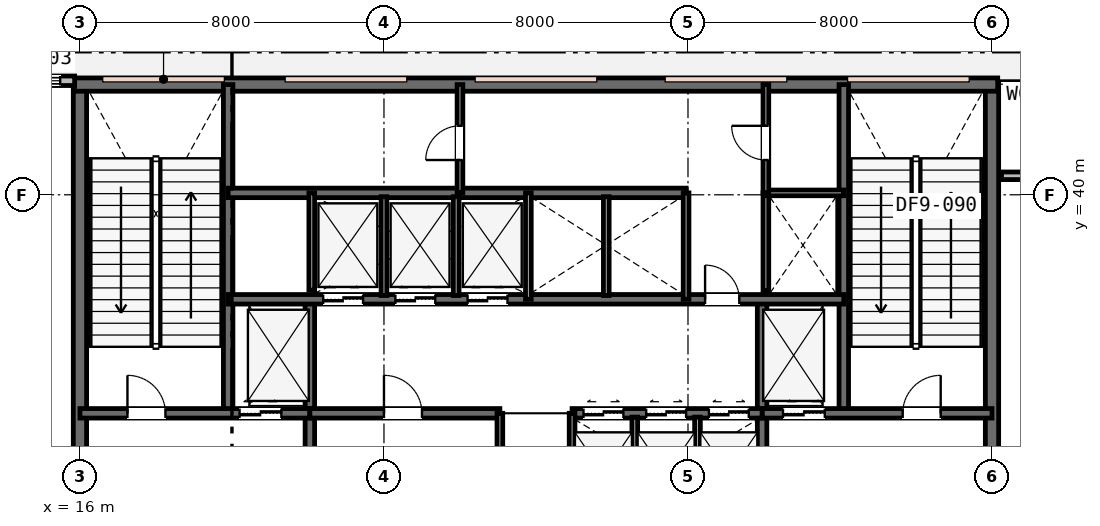
"""IFC4 building model, lengths in metres.
Left out: names, types, materials, properties, quantities, classifications, styles, units other than length and angle.
Written with IfcOpenShell. Run it as: python <this file> out.ifc"""

import sys

from ifc_helpers import new_model, si_unit, direction, frame, frame_2d, origin, place, context, subcontext, project, spatial, rectangle, extrude, element, fill, save


model = new_model("IFC4")
c1 = context("Model", 3, precision=1e-05, world=origin(), true_north=direction((0.0, 1.0)))
c2 = subcontext(c1, "Body", "Model", "MODEL_VIEW")
j1 = project(units=[si_unit("LENGTHUNIT", "METRE"), si_unit("PLANEANGLEUNIT", "RADIAN")], contexts=[c1])
p1 = place(None, origin())
s1 = spatial("IfcSite", under=j1, at=p1, CompositionType="ELEMENT")
p2 = place(p1, origin())
s2 = spatial("IfcBuilding", under=s1, at=p2, CompositionType="ELEMENT")
p3 = place(p2, frame((0.0, 0.0, 148.8)))
s3 = spatial("IfcBuildingStorey", under=s2, at=p3, CompositionType="ELEMENT", Elevation=148.8)
for number, where, z_axis, x_axis in (
    (1, (16.0, 30.65, 0.0), (0.0, 0.0, 1.0), (0.0, 1.0, 0.0)),
    (2, (40.0, 30.65, 0.0), (0.0, 0.0, 1.0), (0.0, 1.0, 0.0)),
):
    element("IfcWall", number, at=place(p3, frame(where, z_axis=z_axis, x_axis=x_axis)), inside=s3, PredefinedType="SHEAR", context=c2, shape_type="SweptSolid", body=[
        extrude(rectangle(XDim=12.3, YDim=0.35, at=frame_2d((6.15, 0.0))), origin(), (0.0, 0.0, 1.0), 5.4),
    ])
p4 = place(p3, frame((15.85, 42.9, 0.0), z_axis=(0.0, 0.0, 1.0), x_axis=(1.0, 0.0, 0.0)))
e3 = element("IfcWall", 3, at=p4, inside=s3, PredefinedType="SHEAR", context=c2, shape_type="SweptSolid", body=[
    extrude(rectangle(XDim=24.3, YDim=0.35, at=frame_2d((12.15, 0.0))), origin(), (0.0, 0.0, 1.0), 5.4),
])
for number, where, z_axis, x_axis in (
    (4, (19.9, 34.25, 0.0), (0.0, 0.0, 1.0), (0.0, 1.0, 0.0)),
    (5, (36.1, 34.25, 0.0), (0.0, 0.0, 1.0), (0.0, 1.0, 0.0)),
):
    element("IfcWall", number, at=place(p3, frame(where, z_axis=z_axis, x_axis=x_axis)), inside=s3, PredefinedType="SHEAR", context=c2, shape_type="SweptSolid", body=[
        extrude(rectangle(XDim=8.65, YDim=0.25, at=frame_2d((4.325, 0.0))), origin(), (0.0, 0.0, 1.0), 5.4),
    ])
for number, where, z_axis, x_axis in (
    (6, (22.05, 30.8, 0.0), (0.0, 0.0, 1.0), (0.0, 1.0, 0.0)),
    (7, (33.95, 30.8, 0.0), (0.0, 0.0, 1.0), (0.0, 1.0, 0.0)),
):
    element("IfcWall", number, at=place(p3, frame(where, z_axis=z_axis, x_axis=x_axis)), inside=s3, PredefinedType="SHEAR", context=c2, shape_type="SweptSolid", body=[
        extrude(rectangle(XDim=6.45, YDim=0.25, at=frame_2d((3.225, 0.0))), origin(), (0.0, 0.0, 1.0), 5.4),
    ])
p5 = place(p3, frame((16.0, 34.25, 0.0), z_axis=(0.0, 0.0, 1.0), x_axis=(1.0, 0.0, 0.0)))
e8 = element("IfcWall", 8, at=p5, inside=s3, PredefinedType="SHEAR", context=c2, shape_type="SweptSolid", body=[
    extrude(rectangle(XDim=6.05, YDim=0.25, at=frame_2d((3.025, 0.0))), origin(), (0.0, 0.0, 1.0), 5.4),
])
p6 = place(p5, frame((1.25, 0.0, 0.0)))
e9 = element("IfcOpeningElement", 9, at=p6, cuts=e8, PredefinedType="OPENING", context=c2, shape_type="SweptSolid", body=[
    extrude(rectangle(XDim=1.0, YDim=2.15, at=frame_2d((0.5, 1.075))), frame((0.0, 0.135, 0.0), z_axis=(0.0, -1.0, 0.0), x_axis=(1.0, 0.0, 0.0)), (0.0, 0.0, 1.0), 0.27),
])
p7 = place(p5, frame((4.2, 0.0, 0.0)))
e10 = element("IfcOpeningElement", 10, at=p7, cuts=e8, PredefinedType="OPENING", context=c2, shape_type="SweptSolid", body=[
    extrude(rectangle(XDim=1.1, YDim=2.15, at=frame_2d((0.55, 1.075))), frame((0.0, 0.135, 0.0), z_axis=(0.0, -1.0, 0.0), x_axis=(1.0, 0.0, 0.0)), (0.0, 0.0, 1.0), 0.27),
])
p8 = place(p3, frame((33.95, 34.25, 0.0), z_axis=(0.0, 0.0, 1.0), x_axis=(1.0, 0.0, 0.0)))
e11 = element("IfcWall", 11, at=p8, inside=s3, PredefinedType="SHEAR", context=c2, shape_type="SweptSolid", body=[
    extrude(rectangle(XDim=6.05, YDim=0.25, at=frame_2d((3.025, 0.0))), origin(), (0.0, 0.0, 1.0), 5.4),
])
p9 = place(p8, frame((3.7, 0.0, 0.0)))
e12 = element("IfcOpeningElement", 12, at=p9, cuts=e11, PredefinedType="OPENING", context=c2, shape_type="SweptSolid", body=[
    extrude(rectangle(XDim=1.0, YDim=2.15, at=frame_2d((0.5, 1.075))), frame((0.0, 0.135, 0.0), z_axis=(0.0, -1.0, 0.0), x_axis=(1.0, 0.0, 0.0)), (0.0, 0.0, 1.0), 0.27),
])
p10 = place(p8, frame((0.55, 0.0, 0.0)))
e13 = element("IfcOpeningElement", 13, at=p10, cuts=e11, PredefinedType="OPENING", context=c2, shape_type="SweptSolid", body=[
    extrude(rectangle(XDim=1.1, YDim=2.15, at=frame_2d((0.55, 1.075))), frame((0.0, 0.135, 0.0), z_axis=(0.0, -1.0, 0.0), x_axis=(1.0, 0.0, 0.0)), (0.0, 0.0, 1.0), 0.27),
])
p11 = place(p3, frame((22.05, 34.25, 0.0), z_axis=(0.0, 0.0, 1.0), x_axis=(1.0, 0.0, 0.0)))
e14 = element("IfcWall", 14, at=p11, inside=s3, PredefinedType="SHEAR", context=c2, shape_type="SweptSolid", body=[
    extrude(rectangle(XDim=5.0, YDim=0.25, at=frame_2d((2.5, 0.0))), origin(), (0.0, 0.0, 1.0), 5.4),
])
p12 = place(p11, frame((1.95, 0.0, 0.0)))
e15 = element("IfcOpeningElement", 15, at=p12, cuts=e14, PredefinedType="OPENING", context=c2, shape_type="SweptSolid", body=[
    extrude(rectangle(XDim=1.0, YDim=2.15, at=frame_2d((0.5, 1.075))), frame((0.0, 0.135, 0.0), z_axis=(0.0, -1.0, 0.0), x_axis=(1.0, 0.0, 0.0)), (0.0, 0.0, 1.0), 0.27),
])
p13 = place(p3, frame((28.95, 34.25, 0.0), z_axis=(0.0, 0.0, 1.0), x_axis=(1.0, 0.0, 0.0)))
e16 = element("IfcWall", 16, at=p13, inside=s3, PredefinedType="SHEAR", context=c2, shape_type="SweptSolid", body=[
    extrude(rectangle(XDim=5.0, YDim=0.25, at=frame_2d((2.5, 0.0))), origin(), (0.0, 0.0, 1.0), 5.4),
])
p14 = place(p13, frame((0.3, 0.0, 0.0)))
e17 = element("IfcOpeningElement", 17, at=p14, cuts=e16, PredefinedType="OPENING", context=c2, shape_type="SweptSolid", body=[
    extrude(rectangle(XDim=1.05, YDim=2.15, at=frame_2d((0.525, 1.075))), frame((0.0, 0.135, 0.0), z_axis=(0.0, -1.0, 0.0), x_axis=(1.0, 0.0, 0.0)), (0.0, 0.0, 1.0), 0.27),
])
p15 = place(p13, frame((1.95, 0.0, 0.0)))
e18 = element("IfcOpeningElement", 18, at=p15, cuts=e16, PredefinedType="OPENING", context=c2, shape_type="SweptSolid", body=[
    extrude(rectangle(XDim=1.05, YDim=2.15, at=frame_2d((0.525, 1.075))), frame((0.0, 0.135, 0.0), z_axis=(0.0, -1.0, 0.0), x_axis=(1.0, 0.0, 0.0)), (0.0, 0.0, 1.0), 0.27),
])
p16 = place(p13, frame((3.6, 0.0, 0.0)))
e19 = element("IfcOpeningElement", 19, at=p16, cuts=e16, PredefinedType="OPENING", context=c2, shape_type="SweptSolid", body=[
    extrude(rectangle(XDim=1.05, YDim=2.15, at=frame_2d((0.525, 1.075))), frame((0.0, 0.135, 0.0), z_axis=(0.0, -1.0, 0.0), x_axis=(1.0, 0.0, 0.0)), (0.0, 0.0, 1.0), 0.27),
])
p17 = place(p3, frame((19.9, 37.25, 0.0), z_axis=(0.0, 0.0, 1.0), x_axis=(1.0, 0.0, 0.0)))
e20 = element("IfcWall", 20, at=p17, inside=s3, PredefinedType="SHEAR", context=c2, shape_type="SweptSolid", body=[
    extrude(rectangle(XDim=16.2, YDim=0.25, at=frame_2d((8.1, 0.0))), origin(), (0.0, 0.0, 1.0), 5.4),
])
p18 = place(p17, frame((12.55, 0.0, 0.0)))
e21 = element("IfcOpeningElement", 21, at=p18, cuts=e20, PredefinedType="OPENING", context=c2, shape_type="SweptSolid", body=[
    extrude(rectangle(XDim=0.9, YDim=2.15, at=frame_2d((0.45, 1.075))), frame((0.0, 0.135, 0.0), z_axis=(0.0, -1.0, 0.0), x_axis=(1.0, 0.0, 0.0)), (0.0, 0.0, 1.0), 0.27),
])
p19 = place(p17, frame((2.5, 0.0, 0.0)))
e22 = element("IfcOpeningElement", 22, at=p19, cuts=e20, PredefinedType="OPENING", context=c2, shape_type="SweptSolid", body=[
    extrude(rectangle(XDim=1.05, YDim=2.15, at=frame_2d((0.525, 1.075))), frame((0.0, 0.135, 0.0), z_axis=(0.0, -1.0, 0.0), x_axis=(1.0, 0.0, 0.0)), (0.0, 0.0, 1.0), 0.27),
])
p20 = place(p17, frame((4.4, 0.0, 0.0)))
e23 = element("IfcOpeningElement", 23, at=p20, cuts=e20, PredefinedType="OPENING", context=c2, shape_type="SweptSolid", body=[
    extrude(rectangle(XDim=1.05, YDim=2.15, at=frame_2d((0.525, 1.075))), frame((0.0, 0.135, 0.0), z_axis=(0.0, -1.0, 0.0), x_axis=(1.0, 0.0, 0.0)), (0.0, 0.0, 1.0), 0.27),
])
p21 = place(p17, frame((6.3, 0.0, 0.0)))
e24 = element("IfcOpeningElement", 24, at=p21, cuts=e20, PredefinedType="OPENING", context=c2, shape_type="SweptSolid", body=[
    extrude(rectangle(XDim=1.05, YDim=2.15, at=frame_2d((0.525, 1.075))), frame((0.0, 0.135, 0.0), z_axis=(0.0, -1.0, 0.0), x_axis=(1.0, 0.0, 0.0)), (0.0, 0.0, 1.0), 0.27),
])
p22 = place(p3, frame((19.9, 40.05, 0.0), z_axis=(0.0, 0.0, 1.0), x_axis=(1.0, 0.0, 0.0)))
e25 = element("IfcWall", 25, at=p22, inside=s3, PredefinedType="SHEAR", context=c2, shape_type="SweptSolid", body=[
    extrude(rectangle(XDim=12.05, YDim=0.25, at=frame_2d((6.025, 0.0))), origin(), (0.0, 0.0, 1.0), 5.4),
])
p23 = place(p3, frame((15.86, 43.0, 0.0), z_axis=(0.0, 0.0, 1.0), x_axis=(-1.0, 0.0, 0.0)))
e26 = element("IfcWall", 26, at=p23, inside=s3, PredefinedType="STANDARD", context=c2, shape_type="SweptSolid", body=[
    extrude(rectangle(XDim=1.66, YDim=0.25, at=frame_2d((0.83, 0.0))), origin(), (0.0, 0.0, 1.0), 5.13),
])
p24 = place(p23, frame((0.38, 0.0, 0.9)))
e27 = element("IfcOpeningElement", 27, at=p24, cuts=e26, PredefinedType="OPENING", context=c2, shape_type="SweptSolid", body=[
    extrude(rectangle(XDim=0.9, YDim=1.55, at=frame_2d((0.45, 0.775))), frame((0.0, 0.135, 0.0), z_axis=(0.0, -1.0, 0.0), x_axis=(1.0, 0.0, 0.0)), (0.0, 0.0, 1.0), 0.27),
])
p25 = place(p3, frame((27.05, 30.8, 0.0), z_axis=(0.0, 0.0, 1.0), x_axis=(0.0, 1.0, 0.0)))
e28 = element("IfcWall", 28, at=p25, inside=s3, PredefinedType="PLUMBINGWALL", context=c2, shape_type="SweptSolid", body=[
    extrude(rectangle(XDim=3.45, YDim=0.15, at=frame_2d((1.725, 0.0))), origin(), (0.0, 0.0, 1.0), 4.76),
])
p26 = place(p3, frame((28.95, 30.8, 0.0), z_axis=(0.0, 0.0, 1.0), x_axis=(0.0, 1.0, 0.0)))
e29 = element("IfcWall", 29, at=p26, inside=s3, PredefinedType="PLUMBINGWALL", context=c2, shape_type="SweptSolid", body=[
    extrude(rectangle(XDim=3.45, YDim=0.15, at=frame_2d((1.725, 0.0))), origin(), (0.0, 0.0, 1.0), 5.13),
])
for number, where, z_axis, x_axis in (
    (30, (30.6, 31.05, 0.0), (0.0, 0.0, 1.0), (0.0, 1.0, 0.0)),
    (31, (32.25, 31.05, 0.0), (0.0, 0.0, 1.0), (0.0, 1.0, 0.0)),
):
    element("IfcWall", number, at=place(p3, frame(where, z_axis=z_axis, x_axis=x_axis)), inside=s3, PredefinedType="PLUMBINGWALL", context=c2, shape_type="SweptSolid", body=[
        extrude(rectangle(XDim=3.1, YDim=0.15, at=frame_2d((1.55, 0.0))), origin(), (0.0, 0.0, 1.0), 5.13),
    ])
p27 = place(p3, frame((22.1, 37.49, 0.0), z_axis=(0.0, 0.0, 1.0), x_axis=(0.0, 1.0, 0.0)))
e32 = element("IfcWall", 32, at=p27, inside=s3, PredefinedType="PLUMBINGWALL", context=c2, shape_type="SweptSolid", body=[
    extrude(rectangle(XDim=2.56, YDim=0.15, at=frame_2d((1.28, 0.0))), origin(), (0.0, 0.0, 1.0), 5.13),
])
p28 = place(p3, frame((27.8, 37.25, 0.0), z_axis=(0.0, 0.0, 1.0), x_axis=(0.0, 1.0, 0.0)))
e33 = element("IfcWall", 33, at=p28, inside=s3, PredefinedType="PLUMBINGWALL", context=c2, shape_type="SweptSolid", body=[
    extrude(rectangle(XDim=2.8, YDim=0.15, at=frame_2d((1.4, 0.0))), origin(), (0.0, 0.0, 1.0), 5.13),
])
for number, where, z_axis, x_axis in (
    (34, (24.0, 37.35, 0.0), (0.0, 0.0, 1.0), (0.0, 1.0, 0.0)),
    (35, (25.9, 37.35, 0.0), (0.0, 0.0, 1.0), (0.0, 1.0, 0.0)),
):
    element("IfcWall", number, at=place(p3, frame(where, z_axis=z_axis, x_axis=x_axis)), inside=s3, PredefinedType="PLUMBINGWALL", context=c2, shape_type="SweptSolid", body=[
        extrude(rectangle(XDim=2.6, YDim=0.15, at=frame_2d((1.3, 0.0))), origin(), (0.0, 0.0, 1.0), 5.13),
    ])
p29 = place(p3, frame((31.95, 37.25, 0.0), z_axis=(0.0, 0.0, 1.0), x_axis=(0.0, 1.0, 0.0)))
e36 = element("IfcWall", 36, at=p29, inside=s3, PredefinedType="PLUMBINGWALL", context=c2, shape_type="SweptSolid", body=[
    extrude(rectangle(XDim=2.8, YDim=0.15, at=frame_2d((1.4, 0.0))), origin(), (0.0, 0.0, 1.0), 5.13),
])
p30 = place(p3, frame((29.85, 37.35, 0.0), z_axis=(0.0, 0.0, 1.0), x_axis=(0.0, 1.0, 0.0)))
e37 = element("IfcWall", 37, at=p30, inside=s3, PredefinedType="PLUMBINGWALL", context=c2, shape_type="SweptSolid", body=[
    extrude(rectangle(XDim=2.6, YDim=0.15, at=frame_2d((1.3, 0.0))), origin(), (0.0, 0.0, 1.0), 5.13),
])
p31 = place(p3, frame((34.05, 37.473, 0.0), z_axis=(0.0, 0.0, 1.0), x_axis=(0.0, 1.0, 0.0)))
e38 = element("IfcWall", 38, at=p31, inside=s3, PredefinedType="PLUMBINGWALL", context=c2, shape_type="SweptSolid", body=[
    extrude(rectangle(XDim=2.577, YDim=0.15, at=frame_2d((1.288, 0.0))), origin(), (0.0, 0.0, 1.0), 5.13),
])
p32 = place(p3, frame((34.05, 40.05, 0.0), z_axis=(0.0, 0.0, 1.0), x_axis=(1.0, 0.0, 0.0)))
e39 = element("IfcWall", 39, at=p32, inside=s3, PredefinedType="PARTITIONING", context=c2, shape_type="SweptSolid", body=[
    extrude(rectangle(XDim=2.05, YDim=0.15, at=frame_2d((1.025, 0.0))), origin(), (0.0, 0.0, 1.0), 5.13),
])
p33 = place(p3, frame((34.05, 40.05, 0.0), z_axis=(0.0, 0.0, 1.0), x_axis=(0.0, 1.0, 0.0)))
e40 = element("IfcWall", 40, at=p33, inside=s3, PredefinedType="PARTITIONING", context=c2, shape_type="SweptSolid", body=[
    extrude(rectangle(XDim=2.85, YDim=0.15, at=frame_2d((1.425, 0.0))), origin(), (0.0, 0.0, 1.0), 5.13),
])
p34 = place(p33, frame((0.865, 0.0, 0.0)))
e41 = element("IfcOpeningElement", 41, at=p34, cuts=e40, PredefinedType="OPENING", context=c2, shape_type="SweptSolid", body=[
    extrude(rectangle(XDim=0.9, YDim=2.15, at=frame_2d((0.45, 1.075))), frame((0.0, 0.085, 0.0), z_axis=(0.0, -1.0, 0.0), x_axis=(1.0, 0.0, 0.0)), (0.0, 0.0, 1.0), 0.17),
])
p35 = place(p3, frame((26.0, 40.05, 0.0), z_axis=(0.0, 0.0, 1.0), x_axis=(0.0, 1.0, 0.0)))
e42 = element("IfcWall", 42, at=p35, inside=s3, PredefinedType="PARTITIONING", context=c2, shape_type="SweptSolid", body=[
    extrude(rectangle(XDim=2.85, YDim=0.15, at=frame_2d((1.425, 0.0))), origin(), (0.0, 0.0, 1.0), 5.13),
])
p36 = place(p35, frame((0.865, 0.0, 0.0)))
e43 = element("IfcOpeningElement", 43, at=p36, cuts=e42, PredefinedType="OPENING", context=c2, shape_type="SweptSolid", body=[
    extrude(rectangle(XDim=0.9, YDim=2.15, at=frame_2d((0.45, 1.075))), frame((0.0, 0.085, 0.0), z_axis=(0.0, -1.0, 0.0), x_axis=(1.0, 0.0, 0.0)), (0.0, 0.0, 1.0), 0.17),
])
p37 = place(p3, frame((40.25, 40.5, 0.0), z_axis=(0.0, 0.0, 1.0), x_axis=(1.0, 0.0, 0.0)))
e44 = element("IfcWall", 44, at=p37, inside=s3, PredefinedType="PARTITIONING", context=c2, shape_type="SweptSolid", body=[
    extrude(rectangle(XDim=2.1, YDim=0.2, at=frame_2d((1.05, 0.0))), origin(), (0.0, 0.0, 1.0), 5.13),
])
p38 = place(p37, frame((0.6, 0.0, 0.0)))
e45 = element("IfcOpeningElement", 45, at=p38, cuts=e44, PredefinedType="OPENING", context=c2, shape_type="SweptSolid", body=[
    extrude(rectangle(XDim=0.9, YDim=2.15, at=frame_2d((0.45, 1.075))), frame((0.0, 0.11, 0.0), z_axis=(0.0, -1.0, 0.0), x_axis=(1.0, 0.0, 0.0)), (0.0, 0.0, 1.0), 0.22),
])
p39 = place(p24, origin())
e46 = element("IfcWindow", 46, at=p39, inside=s3, PartitioningType="SINGLE_PANEL", PredefinedType="WINDOW", context=c2, shape_type="SweptSolid", body=[
    extrude(rectangle(XDim=0.9, YDim=1.55, at=frame_2d((0.45, 0.775))), frame((0.0, 0.03, 0.0), z_axis=(0.0, -1.0, 0.0), x_axis=(1.0, 0.0, 0.0)), (0.0, 0.0, 1.0), 0.06),
])
fill(e27, e46)
p40 = place(p6, origin())
e47 = element("IfcDoor", 47, at=p40, inside=s3, OperationType="SINGLE_SWING_LEFT", PredefinedType="DOOR", context=c2, shape_type="SweptSolid", body=[
    extrude(rectangle(XDim=1.0, YDim=2.15, at=frame_2d((0.5, 1.075))), frame((0.0, 0.025, 0.0), z_axis=(0.0, -1.0, 0.0), x_axis=(1.0, 0.0, 0.0)), (0.0, 0.0, 1.0), 0.05),
])
fill(e9, e47)
p41 = place(p9, origin())
e48 = element("IfcDoor", 48, at=p41, inside=s3, OperationType="SINGLE_SWING_RIGHT", PredefinedType="DOOR", context=c2, shape_type="SweptSolid", body=[
    extrude(rectangle(XDim=1.0, YDim=2.15, at=frame_2d((0.5, 1.075))), frame((0.0, 0.025, 0.0), z_axis=(0.0, -1.0, 0.0), x_axis=(1.0, 0.0, 0.0)), (0.0, 0.0, 1.0), 0.05),
])
fill(e12, e48)
p42 = place(p12, origin())
e49 = element("IfcDoor", 49, at=p42, inside=s3, OperationType="SINGLE_SWING_LEFT", PredefinedType="DOOR", context=c2, shape_type="SweptSolid", body=[
    extrude(rectangle(XDim=1.0, YDim=2.15, at=frame_2d((0.5, 1.075))), frame((0.0, 0.025, 0.0), z_axis=(0.0, -1.0, 0.0), x_axis=(1.0, 0.0, 0.0)), (0.0, 0.0, 1.0), 0.05),
])
fill(e15, e49)
p43 = place(p18, origin())
e50 = element("IfcDoor", 50, at=p43, inside=s3, OperationType="SINGLE_SWING_LEFT", PredefinedType="DOOR", context=c2, shape_type="SweptSolid", body=[
    extrude(rectangle(XDim=0.9, YDim=2.15, at=frame_2d((0.45, 1.075))), frame((0.0, 0.025, 0.0), z_axis=(0.0, -1.0, 0.0), x_axis=(1.0, 0.0, 0.0)), (0.0, 0.0, 1.0), 0.05),
])
fill(e21, e50)
p44 = place(p34, origin())
e51 = element("IfcDoor", 51, at=p44, inside=s3, OperationType="SINGLE_SWING_RIGHT", PredefinedType="DOOR", context=c2, shape_type="SweptSolid", body=[
    extrude(rectangle(XDim=0.9, YDim=2.15, at=frame_2d((0.45, 1.075))), frame((0.0, 0.025, 0.0), z_axis=(0.0, -1.0, 0.0), x_axis=(1.0, 0.0, 0.0)), (0.0, 0.0, 1.0), 0.05),
])
fill(e41, e51)
p45 = place(p36, origin())
e52 = element("IfcDoor", 52, at=p45, inside=s3, OperationType="SINGLE_SWING_LEFT", PredefinedType="DOOR", context=c2, shape_type="SweptSolid", body=[
    extrude(rectangle(XDim=0.9, YDim=2.15, at=frame_2d((0.45, 1.075))), frame((0.0, 0.025, 0.0), z_axis=(0.0, -1.0, 0.0), x_axis=(1.0, 0.0, 0.0)), (0.0, 0.0, 1.0), 0.05),
])
fill(e43, e52)
p46 = place(p7, origin())
e53 = element("IfcDoor", 53, at=p46, inside=s3, OperationType="DOUBLE_DOOR_SLIDING", PredefinedType="DOOR", context=c2, shape_type="SweptSolid", body=[
    extrude(rectangle(XDim=1.1, YDim=2.15, at=frame_2d((0.55, 1.075))), frame((0.0, 0.025, 0.0), z_axis=(0.0, -1.0, 0.0), x_axis=(1.0, 0.0, 0.0)), (0.0, 0.0, 1.0), 0.05),
])
fill(e10, e53)
p47 = place(p10, origin())
e54 = element("IfcDoor", 54, at=p47, inside=s3, OperationType="DOUBLE_DOOR_SLIDING", PredefinedType="DOOR", context=c2, shape_type="SweptSolid", body=[
    extrude(rectangle(XDim=1.1, YDim=2.15, at=frame_2d((0.55, 1.075))), frame((0.0, 0.025, 0.0), z_axis=(0.0, -1.0, 0.0), x_axis=(1.0, 0.0, 0.0)), (0.0, 0.0, 1.0), 0.05),
])
fill(e13, e54)
p48 = place(p14, origin())
e55 = element("IfcDoor", 55, at=p48, inside=s3, OperationType="DOUBLE_DOOR_SLIDING", PredefinedType="DOOR", context=c2, shape_type="SweptSolid", body=[
    extrude(rectangle(XDim=1.05, YDim=2.15, at=frame_2d((0.525, 1.075))), frame((0.0, 0.025, 0.0), z_axis=(0.0, -1.0, 0.0), x_axis=(1.0, 0.0, 0.0)), (0.0, 0.0, 1.0), 0.05),
])
fill(e17, e55)
p49 = place(p15, origin())
e56 = element("IfcDoor", 56, at=p49, inside=s3, OperationType="DOUBLE_DOOR_SLIDING", PredefinedType="DOOR", context=c2, shape_type="SweptSolid", body=[
    extrude(rectangle(XDim=1.05, YDim=2.15, at=frame_2d((0.525, 1.075))), frame((0.0, 0.025, 0.0), z_axis=(0.0, -1.0, 0.0), x_axis=(1.0, 0.0, 0.0)), (0.0, 0.0, 1.0), 0.05),
])
fill(e18, e56)
p50 = place(p16, origin())
e57 = element("IfcDoor", 57, at=p50, inside=s3, OperationType="DOUBLE_DOOR_SLIDING", PredefinedType="DOOR", context=c2, shape_type="SweptSolid", body=[
    extrude(rectangle(XDim=1.05, YDim=2.15, at=frame_2d((0.525, 1.075))), frame((0.0, 0.025, 0.0), z_axis=(0.0, -1.0, 0.0), x_axis=(1.0, 0.0, 0.0)), (0.0, 0.0, 1.0), 0.05),
])
fill(e19, e57)
p51 = place(p19, origin())
e58 = element("IfcDoor", 58, at=p51, inside=s3, OperationType="DOUBLE_DOOR_SLIDING", PredefinedType="DOOR", context=c2, shape_type="SweptSolid", body=[
    extrude(rectangle(XDim=1.05, YDim=2.15, at=frame_2d((0.525, 1.075))), frame((0.0, 0.025, 0.0), z_axis=(0.0, -1.0, 0.0), x_axis=(1.0, 0.0, 0.0)), (0.0, 0.0, 1.0), 0.05),
])
fill(e22, e58)
p52 = place(p20, origin())
e59 = element("IfcDoor", 59, at=p52, inside=s3, OperationType="DOUBLE_DOOR_SLIDING", PredefinedType="DOOR", context=c2, shape_type="SweptSolid", body=[
    extrude(rectangle(XDim=1.05, YDim=2.15, at=frame_2d((0.525, 1.075))), frame((0.0, 0.025, 0.0), z_axis=(0.0, -1.0, 0.0), x_axis=(1.0, 0.0, 0.0)), (0.0, 0.0, 1.0), 0.05),
])
fill(e23, e59)
p53 = place(p21, origin())
e60 = element("IfcDoor", 60, at=p53, inside=s3, OperationType="DOUBLE_DOOR_SLIDING", PredefinedType="DOOR", context=c2, shape_type="SweptSolid", body=[
    extrude(rectangle(XDim=1.05, YDim=2.15, at=frame_2d((0.525, 1.075))), frame((0.0, 0.025, 0.0), z_axis=(0.0, -1.0, 0.0), x_axis=(1.0, 0.0, 0.0)), (0.0, 0.0, 1.0), 0.05),
])
fill(e24, e60)
save(model, sys.argv[1])
